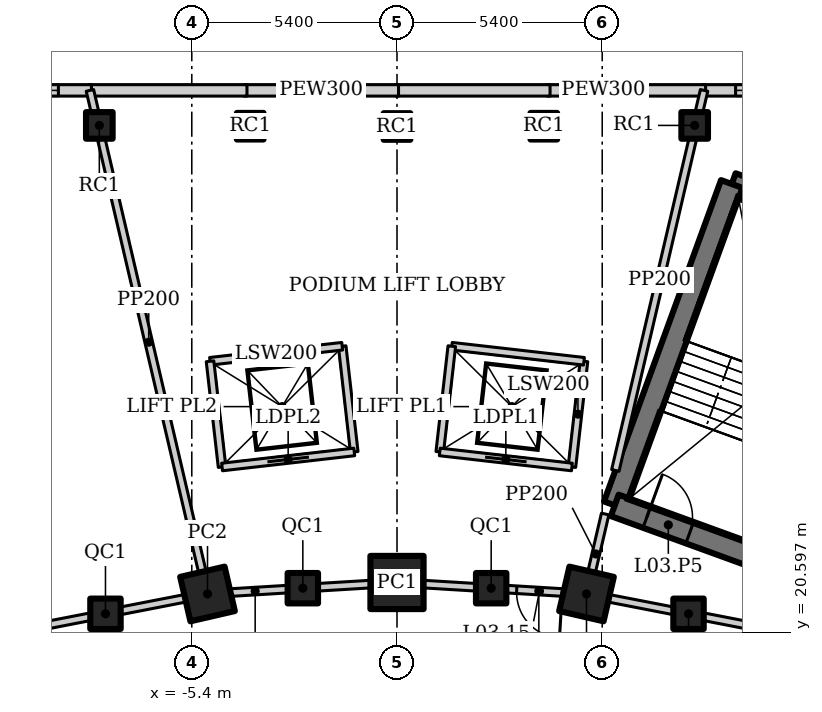
"""IFC4 building model, lengths in metres.
Left out: names, types, materials, properties, quantities, classifications, styles, units other than length and angle.
Written with IfcOpenShell. Run it as: python <this file> out.ifc"""

import sys

from ifc_helpers import new_model, si_unit, direction, frame, frame_2d, origin, origin_2d, place, context, subcontext, project, spatial, rectangle, hollow_rectangle, extrude, element, fill, save


model = new_model("IFC4")
c1 = context("Model", 3, precision=1e-05, world=origin(), true_north=direction((0.0, 1.0)))
c2 = subcontext(c1, "Body", "Model", "MODEL_VIEW")
j1 = project(units=[si_unit("LENGTHUNIT", "METRE"), si_unit("PLANEANGLEUNIT", "RADIAN")], contexts=[c1])
p1 = place(None, origin())
s1 = spatial("IfcSite", under=j1, at=p1, CompositionType="ELEMENT")
p2 = place(p1, origin())
s2 = spatial("IfcBuilding", under=s1, at=p2, CompositionType="ELEMENT")
p3 = place(p2, frame((0.0, 0.0, 22.0)))
s3 = spatial("IfcBuildingStorey", under=s2, at=p3, CompositionType="ELEMENT", Elevation=22.0)
p4 = place(p3, frame((4.986, 21.598, 0.0), z_axis=(0.0, 0.0, 1.0), x_axis=(0.224951054344, 0.974370064785, 0.0)))
e1 = element("IfcColumn", 1, at=p4, inside=s3, PredefinedType="COLUMN", context=c2, shape_type="SweptSolid", body=[
    extrude(hollow_rectangle(XDim=1.2, YDim=1.2, WallThickness=0.1, at=origin_2d()), origin(), (0.0, 0.0, 1.0), 5.0),
])
p5 = place(p3, frame((0.0, 21.9, 0.0), z_axis=(0.0, 0.0, 1.0), x_axis=(1.0, 0.0, 0.0)))
e2 = element("IfcColumn", 2, at=p5, inside=s3, PredefinedType="COLUMN", context=c2, shape_type="SweptSolid", body=[
    extrude(hollow_rectangle(XDim=1.4, YDim=1.4, WallThickness=0.1, at=origin_2d()), origin(), (0.0, 0.0, 1.0), 5.0),
])
p6 = place(p3, frame((-4.986, 21.598, 0.0), z_axis=(0.0, 0.0, 1.0), x_axis=(0.974370064785, 0.224951054344, 0.0)))
e3 = element("IfcColumn", 3, at=p6, inside=s3, PredefinedType="COLUMN", context=c2, shape_type="SweptSolid", body=[
    extrude(hollow_rectangle(XDim=1.2, YDim=1.2, WallThickness=0.1, at=origin_2d()), origin(), (0.0, 0.0, 1.0), 5.0),
])
for number, where, z_axis, x_axis in (
    (4, (7.671, 21.076, 0.0), (0.0, 0.0, 1.0), (1.0, 0.0, 0.0)),
    (5, (2.478, 21.75, 0.0), (0.0, 0.0, 1.0), (1.0, 0.0, 0.0)),
    (6, (-2.478, 21.75, 0.0), (0.0, 0.0, 1.0), (1.0, 0.0, 0.0)),
    (7, (-7.671, 21.076, 0.0), (0.0, 0.0, 1.0), (1.0, 0.0, 0.0)),
):
    element("IfcColumn", number, at=place(p3, frame(where, z_axis=z_axis, x_axis=x_axis)), inside=s3, PredefinedType="COLUMN", context=c2, shape_type="SweptSolid", body=[
        extrude(hollow_rectangle(XDim=0.8, YDim=0.8, WallThickness=0.05, at=origin_2d()), origin(), (0.0, 0.0, 1.0), 5.0),
    ])
for number, where, z_axis, x_axis in (
    (8, (3.863, 33.907, 0.0), (0.0, 0.0, 1.0), (1.0, 0.0, 0.0)),
    (9, (-3.863, 33.907, 0.0), (0.0, 0.0, 1.0), (1.0, 0.0, 0.0)),
    (10, (7.833, 33.928, 0.0), (0.0, 0.0, 1.0), (1.0, 0.0, 0.0)),
    (11, (0.0, 33.9, 0.0), (0.0, 0.0, 1.0), (1.0, 0.0, 0.0)),
    (12, (-7.833, 33.928, 0.0), (0.0, 0.0, 1.0), (1.0, 0.0, 0.0)),
):
    element("IfcColumn", number, at=place(p3, frame(where, z_axis=z_axis, x_axis=x_axis)), inside=s3, PredefinedType="COLUMN", context=c2, shape_type="SweptSolid", body=[
        extrude(hollow_rectangle(XDim=0.7, YDim=0.7, WallThickness=0.04, at=origin_2d()), origin(), (0.0, 0.0, 1.0), 5.0),
    ])
p7 = place(p3, frame((12.779, 34.85, 0.0), z_axis=(0.0, 0.0, 1.0), x_axis=(-1.0, 0.0, 0.0)))
e13 = element("IfcWall", 13, at=p7, inside=s3, PredefinedType="SOLIDWALL", context=c2, shape_type="SweptSolid", body=[
    extrude(rectangle(XDim=4.739, YDim=0.3, at=frame_2d((2.369, 0.0))), origin(), (0.0, 0.0, 1.0), 4.8),
])
p8 = place(p7, frame((0.869, 0.0, 0.9)))
e14 = element("IfcOpeningElement", 14, at=p8, cuts=e13, PredefinedType="OPENING", context=c2, shape_type="SweptSolid", body=[
    extrude(rectangle(XDim=3.0, YDim=2.0, at=frame_2d((1.5, 1.0))), frame((0.0, 0.16, 0.0), z_axis=(0.0, -1.0, 0.0), x_axis=(1.0, 0.0, 0.0)), (0.0, 0.0, 1.0), 0.32),
])
p9 = place(p3, frame((8.12, 34.85, 0.0), z_axis=(0.0, 0.0, 1.0), x_axis=(-1.0, 0.0, 0.0)))
e15 = element("IfcWall", 15, at=p9, inside=s3, PredefinedType="SOLIDWALL", context=c2, shape_type="SweptSolid", body=[
    extrude(rectangle(XDim=4.173, YDim=0.3, at=frame_2d((2.086, 0.0))), origin(), (0.0, 0.0, 1.0), 4.8),
])
for number, where, z_axis, x_axis in (
    (16, (4.028, 34.85, 0.0), (0.0, 0.0, 1.0), (-1.0, 0.0, 0.0)),
    (17, (0.04, 34.85, 0.0), (0.0, 0.0, 1.0), (-1.0, 0.0, 0.0)),
):
    element("IfcWall", number, at=place(p3, frame(where, z_axis=z_axis, x_axis=x_axis)), inside=s3, PredefinedType="SOLIDWALL", context=c2, shape_type="SweptSolid", body=[
        extrude(rectangle(XDim=4.068, YDim=0.3, at=frame_2d((2.034, 0.0))), origin(), (0.0, 0.0, 1.0), 4.8),
    ])
p10 = place(p3, frame((-3.948, 34.85, 0.0), z_axis=(0.0, 0.0, 1.0), x_axis=(-1.0, 0.0, 0.0)))
e18 = element("IfcWall", 18, at=p10, inside=s3, PredefinedType="SOLIDWALL", context=c2, shape_type="SweptSolid", body=[
    extrude(rectangle(XDim=4.173, YDim=0.3, at=frame_2d((2.086, 0.0))), origin(), (0.0, 0.0, 1.0), 4.8),
])
p11 = place(p3, frame((-8.04, 34.85, 0.0), z_axis=(0.0, 0.0, 1.0), x_axis=(-1.0, 0.0, 0.0)))
e19 = element("IfcWall", 19, at=p11, inside=s3, PredefinedType="SOLIDWALL", context=c2, shape_type="SweptSolid", body=[
    extrude(rectangle(XDim=4.739, YDim=0.3, at=frame_2d((2.369, 0.0))), origin(), (0.0, 0.0, 1.0), 4.8),
])
p12 = place(p11, frame((0.869, 0.0, 0.9)))
e20 = element("IfcOpeningElement", 20, at=p12, cuts=e19, PredefinedType="OPENING", context=c2, shape_type="SweptSolid", body=[
    extrude(rectangle(XDim=3.0, YDim=2.0, at=frame_2d((1.5, 1.0))), frame((0.0, 0.16, 0.0), z_axis=(0.0, -1.0, 0.0), x_axis=(1.0, 0.0, 0.0)), (0.0, 0.0, 1.0), 0.32),
])
p13 = place(p3, frame((10.463, 20.534, 0.0), z_axis=(0.0, 0.0, 1.0), x_axis=(-0.98163593748, 0.190763954266, 0.0)))
e21 = element("IfcWall", 21, at=p13, inside=s3, PredefinedType="SOLIDWALL", context=c2, shape_type="SweptSolid", body=[
    extrude(rectangle(XDim=2.844, YDim=0.2, at=frame_2d((1.422, 0.0))), origin(), (0.0, 0.0, 1.0), 4.338),
])
p14 = place(p3, frame((7.671, 21.076, 0.0), z_axis=(0.0, 0.0, 1.0), x_axis=(-0.981637218105, 0.190757364289, 0.0)))
e22 = element("IfcWall", 22, at=p14, inside=s3, PredefinedType="SOLIDWALL", context=c2, shape_type="SweptSolid", body=[
    extrude(rectangle(XDim=2.735, YDim=0.2, at=frame_2d((1.368, 0.0))), origin(), (0.0, 0.0, 1.0), 4.338),
])
p15 = place(p3, frame((4.986, 21.598, 0.0), z_axis=(0.0, 0.0, 1.0), x_axis=(-0.998172405641, 0.060430527186, 0.0)))
e23 = element("IfcWall", 23, at=p15, inside=s3, PredefinedType="SOLIDWALL", context=c2, shape_type="SweptSolid", body=[
    extrude(rectangle(XDim=2.513, YDim=0.2, at=frame_2d((1.256, 0.0))), origin(), (0.0, 0.0, 1.0), 4.396),
])
p16 = place(p15, frame((0.64, 0.0, 0.0)))
e24 = element("IfcOpeningElement", 24, at=p16, cuts=e23, PredefinedType="OPENING", context=c2, shape_type="SweptSolid", body=[
    extrude(rectangle(XDim=1.2, YDim=2.4, at=frame_2d((0.6, 1.2))), frame((0.0, 0.11, 0.0), z_axis=(0.0, -1.0, 0.0), x_axis=(1.0, 0.0, 0.0)), (0.0, 0.0, 1.0), 0.22),
])
p17 = place(p3, frame((2.478, 21.75, 0.0), z_axis=(0.0, 0.0, 1.0), x_axis=(-0.998175328335, 0.060382231685, 0.0)))
e25 = element("IfcWall", 25, at=p17, inside=s3, PredefinedType="SOLIDWALL", context=c2, shape_type="SweptSolid", body=[
    extrude(rectangle(XDim=2.483, YDim=0.2, at=frame_2d((1.241, 0.0))), origin(), (0.0, 0.0, 1.0), 4.302),
])
p18 = place(p3, frame((0.0, 21.9, 0.0), z_axis=(0.0, 0.0, 1.0), x_axis=(-0.998175328335, -0.060382231685, 0.0)))
e26 = element("IfcWall", 26, at=p18, inside=s3, PredefinedType="SOLIDWALL", context=c2, shape_type="SweptSolid", body=[
    extrude(rectangle(XDim=2.483, YDim=0.2, at=frame_2d((1.241, 0.0))), origin(), (0.0, 0.0, 1.0), 3.878),
])
p19 = place(p3, frame((-2.478, 21.75, 0.0), z_axis=(0.0, 0.0, 1.0), x_axis=(-0.998172405641, -0.060430527186, 0.0)))
e27 = element("IfcWall", 27, at=p19, inside=s3, PredefinedType="SOLIDWALL", context=c2, shape_type="SweptSolid", body=[
    extrude(rectangle(XDim=2.513, YDim=0.2, at=frame_2d((1.256, 0.0))), origin(), (0.0, 0.0, 1.0), 4.099),
])
p20 = place(p3, frame((-4.986, 21.598, 0.0), z_axis=(0.0, 0.0, 1.0), x_axis=(-0.981637218105, -0.190757364289, 0.0)))
e28 = element("IfcWall", 28, at=p20, inside=s3, PredefinedType="SOLIDWALL", context=c2, shape_type="SweptSolid", body=[
    extrude(rectangle(XDim=2.735, YDim=0.2, at=frame_2d((1.368, 0.0))), origin(), (0.0, 0.0, 1.0), 4.394),
])
p21 = place(p3, frame((-7.671, 21.076, 0.0), z_axis=(0.0, 0.0, 1.0), x_axis=(-0.98163593748, -0.190763954266, 0.0)))
e29 = element("IfcWall", 29, at=p21, inside=s3, PredefinedType="SOLIDWALL", context=c2, shape_type="SweptSolid", body=[
    extrude(rectangle(XDim=2.844, YDim=0.2, at=frame_2d((1.422, 0.0))), origin(), (0.0, 0.0, 1.0), 4.35),
])
p22 = place(p3, frame((4.986, 21.598, 0.0), z_axis=(0.0, 0.0, 1.0), x_axis=(0.227351065365, 0.973812863479, 0.0)))
e30 = element("IfcWall", 30, at=p22, inside=s3, PredefinedType="SOLIDWALL", context=c2, shape_type="SweptSolid", body=[
    extrude(rectangle(XDim=2.161, YDim=0.2, at=frame_2d((1.08, 0.0))), origin(), (0.0, 0.0, 1.0), 3.3),
])
p23 = place(p3, frame((5.745, 24.849, 0.0), z_axis=(0.0, 0.0, 1.0), x_axis=(0.227353607936, 0.973812269875, 0.0)))
e31 = element("IfcWall", 31, at=p23, inside=s3, PredefinedType="SOLIDWALL", context=c2, shape_type="SweptSolid", body=[
    extrude(rectangle(XDim=10.27, YDim=0.2, at=frame_2d((5.135, 0.0))), origin(), (0.0, 0.0, 1.0), 3.3),
])
p24 = place(p3, frame((-4.986, 21.598, 0.0), z_axis=(0.0, 0.0, 1.0), x_axis=(-0.227360055616, 0.973810764528, 0.0)))
e32 = element("IfcWall", 32, at=p24, inside=s3, PredefinedType="SOLIDWALL", context=c2, shape_type="SweptSolid", body=[
    extrude(rectangle(XDim=13.608, YDim=0.2, at=frame_2d((6.804, 0.0))), origin(), (0.0, 0.0, 1.0), 4.028),
])
p25 = place(p3, frame((14.07, 30.471, 0.0), z_axis=(0.0, 0.0, 1.0), x_axis=(-0.939692822968, 0.342019587834, 0.0)))
e33 = element("IfcWall", 33, at=p25, inside=s3, PredefinedType="SHEAR", context=c2, shape_type="SweptSolid", body=[
    extrude(rectangle(XDim=5.6, YDim=0.6, at=frame_2d((2.8, 0.0))), origin(), (0.0, 0.0, 1.0), 5.0),
])
p26 = place(p3, frame((8.808, 32.387, 0.0), z_axis=(0.0, 0.0, 1.0), x_axis=(-0.3420218461, -0.939692001025, 0.0)))
e34 = element("IfcWall", 34, at=p26, inside=s3, PredefinedType="SHEAR", context=c2, shape_type="SweptSolid", body=[
    extrude(rectangle(XDim=9.0, YDim=0.6, at=frame_2d((4.5, 0.0))), origin(), (0.0, 0.0, 1.0), 5.0),
])
p27 = place(p3, frame((5.73, 23.93, 0.0), z_axis=(0.0, 0.0, 1.0), x_axis=(0.939678810556, -0.342058084236, 0.0)))
e35 = element("IfcWall", 35, at=p27, inside=s3, PredefinedType="SHEAR", context=c2, shape_type="SweptSolid", body=[
    extrude(rectangle(XDim=5.6, YDim=0.6, at=frame_2d((2.8, 0.0))), origin(), (0.0, 0.0, 1.0), 5.0),
])
p28 = place(p27, frame((0.9, 0.0, 0.0)))
e36 = element("IfcOpeningElement", 36, at=p28, cuts=e35, PredefinedType="OPENING", context=c2, shape_type="SweptSolid", body=[
    extrude(rectangle(XDim=1.2, YDim=2.1, at=frame_2d((0.6, 1.05))), frame((0.0, 0.31, 0.0), z_axis=(0.0, -1.0, 0.0), x_axis=(1.0, 0.0, 0.0)), (0.0, 0.0, 1.0), 0.62),
])
p29 = place(p3, frame((4.603, 24.939, 0.0), z_axis=(0.0, 0.0, 1.0), x_axis=(0.113177712989, 0.993574760792, 0.0)))
e37 = element("IfcWall", 37, at=p29, inside=s3, PredefinedType="SOLIDWALL", context=c2, shape_type="SweptSolid", body=[
    extrude(rectangle(XDim=2.8, YDim=0.2, at=frame_2d((1.4, 0.0))), origin(), (0.0, 0.0, 1.0), 4.8),
])
p30 = place(p3, frame((4.92, 27.721, 0.0), z_axis=(0.0, 0.0, 1.0), x_axis=(-0.993571061716, 0.113210182053, 0.0)))
e38 = element("IfcWall", 38, at=p30, inside=s3, PredefinedType="SOLIDWALL", context=c2, shape_type="SweptSolid", body=[
    extrude(rectangle(XDim=3.5, YDim=0.2, at=frame_2d((1.75, 0.0))), origin(), (0.0, 0.0, 1.0), 3.3),
])
p31 = place(p3, frame((1.442, 28.117, 0.0), z_axis=(0.0, 0.0, 1.0), x_axis=(-0.113177712989, -0.993574760792, 0.0)))
e39 = element("IfcWall", 39, at=p31, inside=s3, PredefinedType="SOLIDWALL", context=c2, shape_type="SweptSolid", body=[
    extrude(rectangle(XDim=2.8, YDim=0.2, at=frame_2d((1.4, 0.0))), origin(), (0.0, 0.0, 1.0), 4.8),
])
p32 = place(p3, frame((1.125, 25.335, 0.0), z_axis=(0.0, 0.0, 1.0), x_axis=(0.993571061716, -0.113210182053, 0.0)))
e40 = element("IfcWall", 40, at=p32, inside=s3, PredefinedType="SOLIDWALL", context=c2, shape_type="SweptSolid", body=[
    extrude(rectangle(XDim=3.5, YDim=0.2, at=frame_2d((1.75, 0.0))), origin(), (0.0, 0.0, 1.0), 3.3),
])
p33 = place(p32, frame((1.2, 0.0, 0.0)))
e41 = element("IfcOpeningElement", 41, at=p33, cuts=e40, PredefinedType="OPENING", context=c2, shape_type="SweptSolid", body=[
    extrude(rectangle(XDim=1.1, YDim=2.2, at=frame_2d((0.55, 1.1))), frame((0.0, 0.11, 0.0), z_axis=(0.0, -1.0, 0.0), x_axis=(1.0, 0.0, 0.0)), (0.0, 0.0, 1.0), 0.22),
])
p34 = place(p3, frame((-1.125, 25.335, 0.0), z_axis=(0.0, 0.0, 1.0), x_axis=(-0.113177712989, 0.993574760792, 0.0)))
e42 = element("IfcWall", 42, at=p34, inside=s3, PredefinedType="SOLIDWALL", context=c2, shape_type="SweptSolid", body=[
    extrude(rectangle(XDim=2.8, YDim=0.2, at=frame_2d((1.4, 0.0))), origin(), (0.0, 0.0, 1.0), 4.8),
])
p35 = place(p3, frame((-1.442, 28.117, 0.0), z_axis=(0.0, 0.0, 1.0), x_axis=(-0.993571061716, -0.113210182053, 0.0)))
e43 = element("IfcWall", 43, at=p35, inside=s3, PredefinedType="SOLIDWALL", context=c2, shape_type="SweptSolid", body=[
    extrude(rectangle(XDim=3.5, YDim=0.2, at=frame_2d((1.75, 0.0))), origin(), (0.0, 0.0, 1.0), 4.8),
])
p36 = place(p3, frame((-4.92, 27.721, 0.0), z_axis=(0.0, 0.0, 1.0), x_axis=(0.113177712989, -0.993574760792, 0.0)))
e44 = element("IfcWall", 44, at=p36, inside=s3, PredefinedType="SOLIDWALL", context=c2, shape_type="SweptSolid", body=[
    extrude(rectangle(XDim=2.8, YDim=0.2, at=frame_2d((1.4, 0.0))), origin(), (0.0, 0.0, 1.0), 4.8),
])
p37 = place(p3, frame((-4.603, 24.939, 0.0), z_axis=(0.0, 0.0, 1.0), x_axis=(0.993571061716, 0.113210182053, 0.0)))
e45 = element("IfcWall", 45, at=p37, inside=s3, PredefinedType="SOLIDWALL", context=c2, shape_type="SweptSolid", body=[
    extrude(rectangle(XDim=3.5, YDim=0.2, at=frame_2d((1.75, 0.0))), origin(), (0.0, 0.0, 1.0), 4.8),
])
p38 = place(p37, frame((1.2, 0.0, 0.0)))
e46 = element("IfcOpeningElement", 46, at=p38, cuts=e45, PredefinedType="OPENING", context=c2, shape_type="SweptSolid", body=[
    extrude(rectangle(XDim=1.1, YDim=2.2, at=frame_2d((0.55, 1.1))), frame((0.0, 0.11, 0.0), z_axis=(0.0, -1.0, 0.0), x_axis=(1.0, 0.0, 0.0)), (0.0, 0.0, 1.0), 0.22),
])
p39 = place(p8, origin())
e47 = element("IfcWindow", 47, at=p39, inside=s3, PartitioningType="SINGLE_PANEL", PredefinedType="WINDOW", context=c2, shape_type="SweptSolid", body=[
    extrude(rectangle(XDim=3.0, YDim=2.0, at=frame_2d((1.5, 1.0))), frame((0.0, 0.03, 0.0), z_axis=(0.0, -1.0, 0.0), x_axis=(1.0, 0.0, 0.0)), (0.0, 0.0, 1.0), 0.06),
])
fill(e14, e47)
p40 = place(p12, origin())
e48 = element("IfcWindow", 48, at=p40, inside=s3, PartitioningType="SINGLE_PANEL", PredefinedType="WINDOW", context=c2, shape_type="SweptSolid", body=[
    extrude(rectangle(XDim=3.0, YDim=2.0, at=frame_2d((1.5, 1.0))), frame((0.0, 0.03, 0.0), z_axis=(0.0, -1.0, 0.0), x_axis=(1.0, 0.0, 0.0)), (0.0, 0.0, 1.0), 0.06),
])
fill(e20, e48)
p41 = place(p16, origin())
e49 = element("IfcDoor", 49, at=p41, inside=s3, OperationType="SINGLE_SWING_RIGHT", PredefinedType="DOOR", context=c2, shape_type="SweptSolid", body=[
    extrude(rectangle(XDim=1.2, YDim=2.4, at=frame_2d((0.6, 1.2))), frame((0.0, 0.025, 0.0), z_axis=(0.0, -1.0, 0.0), x_axis=(1.0, 0.0, 0.0)), (0.0, 0.0, 1.0), 0.05),
])
fill(e24, e49)
p42 = place(p28, origin())
e50 = element("IfcDoor", 50, at=p42, inside=s3, OperationType="SINGLE_SWING_RIGHT", PredefinedType="DOOR", context=c2, shape_type="SweptSolid", body=[
    extrude(rectangle(XDim=1.2, YDim=2.1, at=frame_2d((0.6, 1.05))), frame((0.0, 0.025, 0.0), z_axis=(0.0, -1.0, 0.0), x_axis=(1.0, 0.0, 0.0)), (0.0, 0.0, 1.0), 0.05),
])
fill(e36, e50)
p43 = place(p33, origin())
e51 = element("IfcDoor", 51, at=p43, inside=s3, OperationType="DOUBLE_DOOR_SLIDING", PredefinedType="DOOR", context=c2, shape_type="SweptSolid", body=[
    extrude(rectangle(XDim=1.1, YDim=2.2, at=frame_2d((0.55, 1.1))), frame((0.0, 0.025, 0.0), z_axis=(0.0, -1.0, 0.0), x_axis=(1.0, 0.0, 0.0)), (0.0, 0.0, 1.0), 0.05),
])
fill(e41, e51)
p44 = place(p38, origin())
e52 = element("IfcDoor", 52, at=p44, inside=s3, OperationType="DOUBLE_DOOR_SLIDING", PredefinedType="DOOR", context=c2, shape_type="SweptSolid", body=[
    extrude(rectangle(XDim=1.1, YDim=2.2, at=frame_2d((0.55, 1.1))), frame((0.0, 0.025, 0.0), z_axis=(0.0, -1.0, 0.0), x_axis=(1.0, 0.0, 0.0)), (0.0, 0.0, 1.0), 0.05),
])
fill(e46, e52)
save(model, sys.argv[1])
